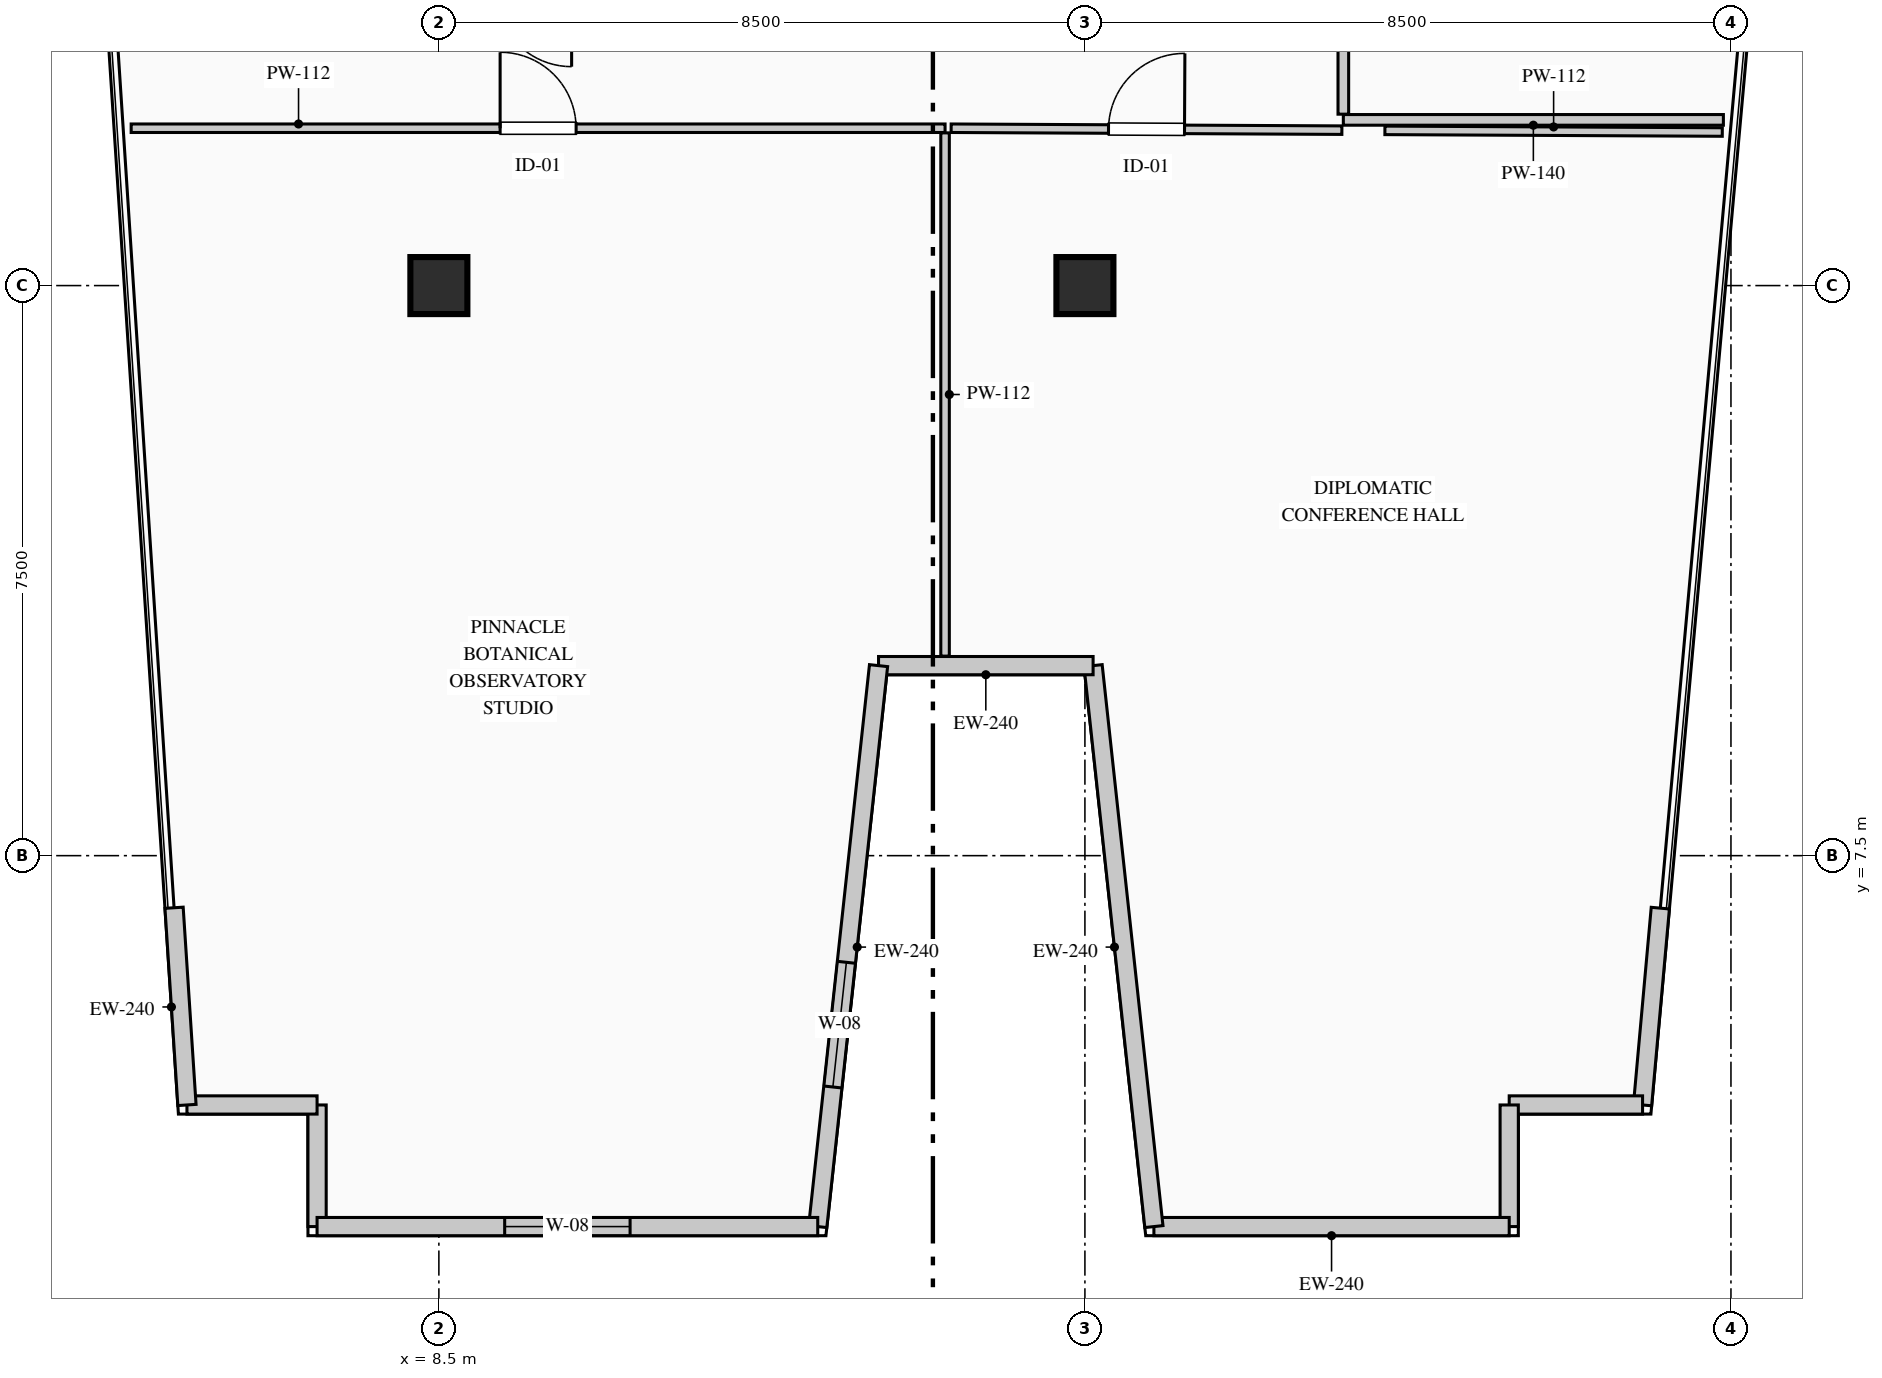
"""IFC4 building model, lengths in metres.
Left out: names, types, materials, properties, quantities, classifications, styles, units other than length and angle.
Written with IfcOpenShell. Run it as: python <this file> out.ifc"""

import sys

from ifc_helpers import new_model, si_unit, direction, frame, frame_2d, origin, origin_2d, place, context, subcontext, project, spatial, rectangle, extrude, element, fill, save


model = new_model("IFC4")
c1 = context("Model", 3, precision=1e-05, world=origin(), true_north=direction((0.0, 1.0)))
c2 = subcontext(c1, "Body", "Model", "MODEL_VIEW")
j1 = project(units=[si_unit("LENGTHUNIT", "METRE"), si_unit("PLANEANGLEUNIT", "RADIAN")], contexts=[c1])
p1 = place(None, origin())
s1 = spatial("IfcSite", under=j1, at=p1, CompositionType="ELEMENT")
p2 = place(p1, origin())
s2 = spatial("IfcBuilding", under=s1, at=p2, CompositionType="ELEMENT")
p3 = place(p2, frame((0.0, 0.0, 319.9)))
s3 = spatial("IfcBuildingStorey", under=s2, at=p3, CompositionType="ELEMENT", Elevation=319.9)
for number, where, z_axis, x_axis in (
    (1, (8.5, 15.0, 0.0), (0.0, 0.0, 1.0), (1.0, 0.0, 0.0)),
    (2, (17.0, 15.0, 0.0), (0.0, 0.0, 1.0), (1.0, 0.0, 0.0)),
):
    element("IfcColumn", number, at=place(p3, frame(where, z_axis=z_axis, x_axis=x_axis)), inside=s3, PredefinedType="COLUMN", context=c2, shape_type="SweptSolid", body=[
        extrude(rectangle(XDim=0.75, YDim=0.75, at=origin_2d()), origin(), (0.0, 0.0, 1.0), 4.15),
    ])
p4 = place(p3, frame((6.897, 2.62, 0.0), z_axis=(0.0, 0.0, 1.0), x_axis=(0.0, 1.0, 0.0)))
e3 = element("IfcWall", 3, at=p4, inside=s3, PredefinedType="STANDARD", context=c2, shape_type="SweptSolid", body=[
    extrude(rectangle(XDim=1.6, YDim=0.24, at=frame_2d((0.8, 0.0))), origin(), (0.0, 0.0, 1.0), 3.83),
])
p5 = place(p3, frame((6.897, 4.22, 0.0), z_axis=(0.0, 0.0, 1.0), x_axis=(-1.0, 0.0, 0.0)))
e4 = element("IfcWall", 4, at=p5, inside=s3, PredefinedType="STANDARD", context=c2, shape_type="SweptSolid", body=[
    extrude(rectangle(XDim=1.712, YDim=0.24, at=frame_2d((0.856, 0.0))), origin(), (0.0, 0.0, 1.0), 3.83),
])
for number, where, z_axis, x_axis in (
    (5, (5.185, 4.22, 0.0), (0.0, 0.0, 1.0), (-0.065, 0.998, 0.0)),
    (6, (24.571, 6.81, 0.0), (0.0, 0.0, 1.0), (-0.09, -0.996, 0.0)),
):
    element("IfcWall", number, at=place(p3, frame(where, z_axis=z_axis, x_axis=x_axis)), inside=s3, PredefinedType="STANDARD", context=c2, shape_type="SweptSolid", body=[
        extrude(rectangle(XDim=2.6, YDim=0.24, at=frame_2d((1.3, 0.0))), origin(), (0.0, 0.0, 1.0), 3.83),
    ])
p6 = place(p3, frame((24.337, 4.22, 0.0), z_axis=(0.0, 0.0, 1.0), x_axis=(-1.0, 0.0, 0.0)))
e7 = element("IfcWall", 7, at=p6, inside=s3, PredefinedType="STANDARD", context=c2, shape_type="SweptSolid", body=[
    extrude(rectangle(XDim=1.755, YDim=0.24, at=frame_2d((0.877, 0.0))), origin(), (0.0, 0.0, 1.0), 3.83),
])
p7 = place(p3, frame((22.583, 4.22, 0.0), z_axis=(0.0, 0.0, 1.0), x_axis=(0.0, -1.0, 0.0)))
e8 = element("IfcWall", 8, at=p7, inside=s3, PredefinedType="STANDARD", context=c2, shape_type="SweptSolid", body=[
    extrude(rectangle(XDim=1.6, YDim=0.24, at=frame_2d((0.8, 0.0))), origin(), (0.0, 0.0, 1.0), 3.83),
])
p8 = place(p3, frame((22.583, 2.62, 0.0), z_axis=(0.0, 0.0, 1.0), x_axis=(-1.0, 0.0, 0.0)))
e9 = element("IfcWall", 9, at=p8, inside=s3, PredefinedType="STANDARD", context=c2, shape_type="SweptSolid", body=[
    extrude(rectangle(XDim=4.675, YDim=0.24, at=frame_2d((2.337, 0.0))), origin(), (0.0, 0.0, 1.0), 3.83),
])
p9 = place(p3, frame((17.908, 2.62, 0.0), z_axis=(0.0, 0.0, 1.0), x_axis=(-0.107777936076, 0.994174992894, 0.0)))
e10 = element("IfcWall", 10, at=p9, inside=s3, PredefinedType="STANDARD", context=c2, shape_type="SweptSolid", body=[
    extrude(rectangle(XDim=7.423, YDim=0.24, at=frame_2d((3.711, 0.0))), origin(), (0.0, 0.0, 1.0), 3.83),
])
p10 = place(p3, frame((17.108, 10.0, 0.0), z_axis=(0.0, 0.0, 1.0), x_axis=(-1.0, 0.0, 0.0)))
e11 = element("IfcWall", 11, at=p10, inside=s3, PredefinedType="STANDARD", context=c2, shape_type="SweptSolid", body=[
    extrude(rectangle(XDim=2.823, YDim=0.24, at=frame_2d((1.411, 0.0))), origin(), (0.0, 0.0, 1.0), 3.83),
])
p11 = place(p3, frame((14.285, 10.0, 0.0), z_axis=(0.0, 0.0, 1.0), x_axis=(-0.107777936076, -0.994174992894, 0.0)))
e12 = element("IfcWall", 12, at=p11, inside=s3, PredefinedType="STANDARD", context=c2, shape_type="SweptSolid", body=[
    extrude(rectangle(XDim=7.423, YDim=0.24, at=frame_2d((3.711, 0.0))), origin(), (0.0, 0.0, 1.0), 3.83),
])
p12 = place(p11, frame((3.926, 0.0, 0.9)))
e13 = element("IfcOpeningElement", 13, at=p12, cuts=e12, PredefinedType="OPENING", context=c2, shape_type="SweptSolid", body=[
    extrude(rectangle(XDim=1.65, YDim=1.95, at=frame_2d((0.825, 0.975))), frame((0.0, 0.13, 0.0), z_axis=(0.0, -1.0, 0.0), x_axis=(1.0, 0.0, 0.0)), (0.0, 0.0, 1.0), 0.26),
])
p13 = place(p3, frame((13.485, 2.62, 0.0), z_axis=(0.0, 0.0, 1.0), x_axis=(-1.0, 0.0, 0.0)))
e14 = element("IfcWall", 14, at=p13, inside=s3, PredefinedType="STANDARD", context=c2, shape_type="SweptSolid", body=[
    extrude(rectangle(XDim=6.587, YDim=0.24, at=frame_2d((3.294, 0.0))), origin(), (0.0, 0.0, 1.0), 3.83),
])
p14 = place(p13, frame((2.469, 0.0, 0.9)))
e15 = element("IfcOpeningElement", 15, at=p14, cuts=e14, PredefinedType="OPENING", context=c2, shape_type="SweptSolid", body=[
    extrude(rectangle(XDim=1.65, YDim=1.95, at=frame_2d((0.825, 0.975))), frame((0.0, 0.13, 0.0), z_axis=(0.0, -1.0, 0.0), x_axis=(1.0, 0.0, 0.0)), (0.0, 0.0, 1.0), 0.26),
])
p15 = place(p3, frame((25.4, 17.18, 0.0), z_axis=(0.0, 0.0, 1.0), x_axis=(-1.0, 0.0, 0.0)))
e16 = element("IfcWall", 16, at=p15, inside=s3, PredefinedType="PARTITIONING", context=c2, shape_type="SweptSolid", body=[
    extrude(rectangle(XDim=5.0, YDim=0.14, at=frame_2d((2.5, 0.0))), origin(), (0.0, 0.0, 1.0), 3.83),
])
p16 = place(p3, frame((20.4, 17.255, 0.0), z_axis=(0.0, 0.0, 1.0), x_axis=(0.0, 1.0, 0.0)))
e17 = element("IfcWall", 17, at=p16, inside=s3, PredefinedType="PARTITIONING", context=c2, shape_type="SweptSolid", body=[
    extrude(rectangle(XDim=3.995, YDim=0.14, at=frame_2d((1.998, 0.0))), origin(), (0.0, 0.0, 1.0), 3.83),
])
p17 = place(p16, frame((1.522, 0.0, 0.0)))
e18 = element("IfcOpeningElement", 18, at=p17, cuts=e17, PredefinedType="OPENING", context=c2, shape_type="SweptSolid", body=[
    extrude(rectangle(XDim=0.95, YDim=2.15, at=frame_2d((0.475, 1.075))), frame((0.0, 0.08, 0.0), z_axis=(0.0, -1.0, 0.0), x_axis=(1.0, 0.0, 0.0)), (0.0, 0.0, 1.0), 0.16),
])
p18 = place(p3, frame((4.451, 17.07, 0.0), z_axis=(0.0, 0.0, 1.0), x_axis=(1.0, 0.0, 0.0)))
e19 = element("IfcWall", 19, at=p18, inside=s3, PredefinedType="PARTITIONING", context=c2, shape_type="SweptSolid", body=[
    extrude(rectangle(XDim=10.708, YDim=0.112, at=frame_2d((5.354, 0.0))), origin(), (0.0, 0.0, 1.0), 3.83),
])
p19 = place(p18, frame((4.854, 0.0, 0.0)))
e20 = element("IfcOpeningElement", 20, at=p19, cuts=e19, PredefinedType="OPENING", context=c2, shape_type="SweptSolid", body=[
    extrude(rectangle(XDim=1.0, YDim=2.15, at=frame_2d((0.5, 1.075))), frame((0.0, 0.066, 0.0), z_axis=(0.0, -1.0, 0.0), x_axis=(1.0, 0.0, 0.0)), (0.0, 0.0, 1.0), 0.132),
])
p20 = place(p3, frame((15.16, 17.009, 0.0), z_axis=(0.0, 0.0, 1.0), x_axis=(0.0, -1.0, 0.0)))
e21 = element("IfcWall", 21, at=p20, inside=s3, PredefinedType="PARTITIONING", context=c2, shape_type="SweptSolid", body=[
    extrude(rectangle(XDim=6.884, YDim=0.112, at=frame_2d((3.442, 0.0))), origin(), (0.0, 0.0, 1.0), 3.83),
])
p21 = place(p3, frame((20.947, 17.042, 0.0), z_axis=(0.0, 0.0, 1.0), x_axis=(0.999988019942, -0.004894892409, 0.0)))
e22 = element("IfcWall", 22, at=p21, inside=s3, PredefinedType="PARTITIONING", context=c2, shape_type="SweptSolid", body=[
    extrude(rectangle(XDim=4.439, YDim=0.112, at=frame_2d((2.219, 0.0))), origin(), (0.0, 0.0, 1.0), 3.83),
])
p22 = place(p3, frame((15.24, 17.07, 0.0), z_axis=(0.0, 0.0, 1.0), x_axis=(0.999988036902, -0.0048914265, 0.0)))
e23 = element("IfcWall", 23, at=p22, inside=s3, PredefinedType="PARTITIONING", context=c2, shape_type="SweptSolid", body=[
    extrude(rectangle(XDim=5.141, YDim=0.112, at=frame_2d((2.57, 0.0))), origin(), (0.0, 0.0, 1.0), 3.83),
])
p23 = place(p22, frame((2.071, 0.0, 0.0)))
e24 = element("IfcOpeningElement", 24, at=p23, cuts=e23, PredefinedType="OPENING", context=c2, shape_type="SweptSolid", body=[
    extrude(rectangle(XDim=1.0, YDim=2.15, at=frame_2d((0.5, 1.075))), frame((0.0, 0.066, 0.0), z_axis=(0.0, -1.0, 0.0), x_axis=(1.0, 0.0, 0.0)), (0.0, 0.0, 1.0), 0.132),
])
p24 = place(p12, origin())
e25 = element("IfcWindow", 25, at=p24, inside=s3, PartitioningType="SINGLE_PANEL", PredefinedType="WINDOW", context=c2, shape_type="SweptSolid", body=[
    extrude(rectangle(XDim=1.65, YDim=1.95, at=frame_2d((0.825, 0.975))), frame((0.0, 0.03, 0.0), z_axis=(0.0, -1.0, 0.0), x_axis=(1.0, 0.0, 0.0)), (0.0, 0.0, 1.0), 0.06),
])
fill(e13, e25)
p25 = place(p14, origin())
e26 = element("IfcWindow", 26, at=p25, inside=s3, PartitioningType="SINGLE_PANEL", PredefinedType="WINDOW", context=c2, shape_type="SweptSolid", body=[
    extrude(rectangle(XDim=1.65, YDim=1.95, at=frame_2d((0.825, 0.975))), frame((0.0, 0.03, 0.0), z_axis=(0.0, -1.0, 0.0), x_axis=(1.0, 0.0, 0.0)), (0.0, 0.0, 1.0), 0.06),
])
fill(e15, e26)
p26 = place(p19, origin())
e27 = element("IfcDoor", 27, at=p26, inside=s3, OperationType="SINGLE_SWING_LEFT", PredefinedType="DOOR", context=c2, shape_type="SweptSolid", body=[
    extrude(rectangle(XDim=1.0, YDim=2.15, at=frame_2d((0.5, 1.075))), frame((0.0, 0.025, 0.0), z_axis=(0.0, -1.0, 0.0), x_axis=(1.0, 0.0, 0.0)), (0.0, 0.0, 1.0), 0.05),
])
fill(e20, e27)
p27 = place(p23, origin())
e28 = element("IfcDoor", 28, at=p27, inside=s3, OperationType="SINGLE_SWING_RIGHT", PredefinedType="DOOR", context=c2, shape_type="SweptSolid", body=[
    extrude(rectangle(XDim=1.0, YDim=2.15, at=frame_2d((0.5, 1.075))), frame((0.0, 0.025, 0.0), z_axis=(0.0, -1.0, 0.0), x_axis=(1.0, 0.0, 0.0)), (0.0, 0.0, 1.0), 0.05),
])
fill(e24, e28)
save(model, sys.argv[1])
